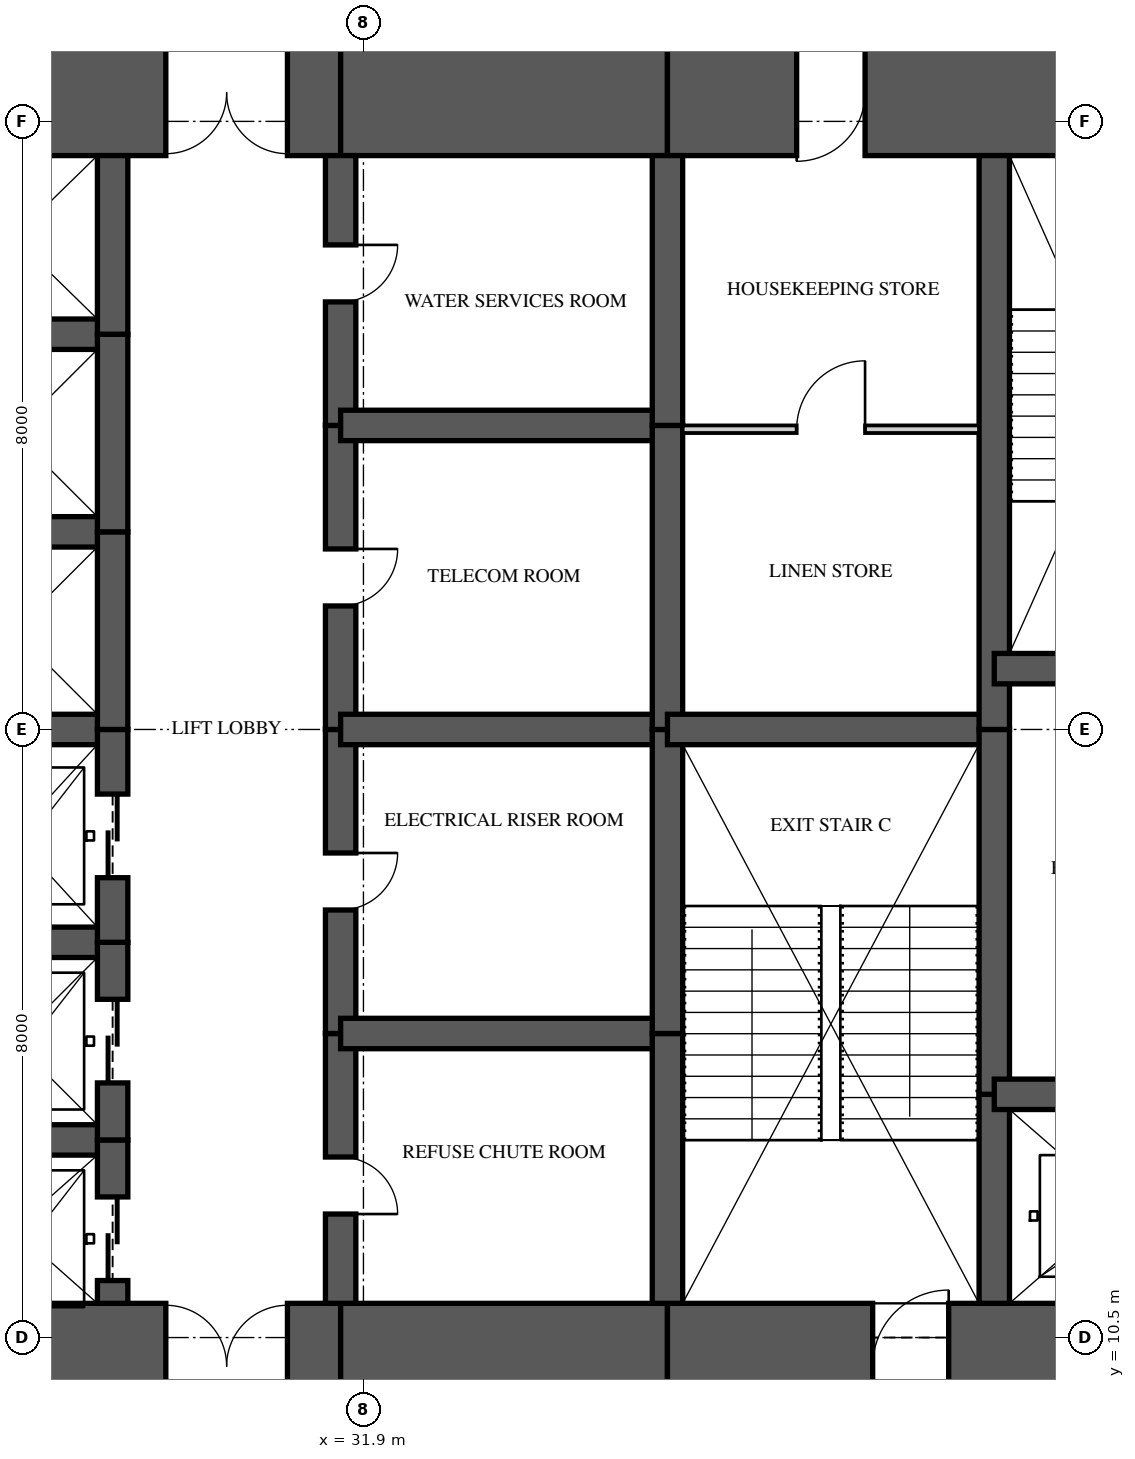
"""IFC4 building model, lengths in metres.
Left out: names, types, materials, properties, quantities, classifications, styles, units other than length and angle.
Written with IfcOpenShell. Run it as: python <this file> out.ifc"""

import sys

from ifc_helpers import new_model, si_unit, direction, frame, frame_2d, origin, place, context, subcontext, project, spatial, rectangle, extrude, element, fill, save


model = new_model("IFC4")
c1 = context("Model", 3, precision=1e-05, world=origin(), true_north=direction((0.0, 1.0)))
c2 = subcontext(c1, "Body", "Model", "MODEL_VIEW")
j1 = project(units=[si_unit("LENGTHUNIT", "METRE"), si_unit("PLANEANGLEUNIT", "RADIAN")], contexts=[c1])
p1 = place(None, origin())
s1 = spatial("IfcSite", under=j1, at=p1, CompositionType="ELEMENT")
p2 = place(p1, origin())
s2 = spatial("IfcBuilding", under=s1, at=p2, CompositionType="ELEMENT")
p3 = place(p2, frame((0.0, 0.0, 54.5)))
s3 = spatial("IfcBuildingStorey", under=s2, at=p3, CompositionType="ELEMENT", Elevation=54.5)
p4 = place(p3, frame((26.0, 10.125, 0.0), z_axis=(0.0, 0.0, 1.0), x_axis=(1.0, 0.0, 0.0)))
e1 = element("IfcWall", 1, at=p4, inside=s3, PredefinedType="SHEAR", context=c2, shape_type="SweptSolid", body=[
    extrude(rectangle(XDim=5.6, YDim=1.65, at=frame_2d((2.8, 0.0))), origin(), (0.0, 0.0, 1.0), 3.35),
])
p5 = place(p4, frame((3.3, 0.0, 0.0)))
e2 = element("IfcOpeningElement", 2, at=p5, cuts=e1, PredefinedType="OPENING", context=c2, shape_type="SweptSolid", body=[
    extrude(rectangle(XDim=1.6, YDim=2.1, at=frame_2d((0.8, 1.05))), frame((0.0, 0.835, 0.0), z_axis=(0.0, -1.0, 0.0), x_axis=(1.0, 0.0, 0.0)), (0.0, 0.0, 1.0), 1.67),
])
p6 = place(p3, frame((31.6, 10.125, 0.0), z_axis=(0.0, 0.0, 1.0), x_axis=(1.0, 0.0, 0.0)))
e3 = element("IfcWall", 3, at=p6, inside=s3, PredefinedType="SHEAR", context=c2, shape_type="SweptSolid", body=[
    extrude(rectangle(XDim=4.3, YDim=1.65, at=frame_2d((2.15, 0.0))), origin(), (0.0, 0.0, 1.0), 3.35),
])
p7 = place(p3, frame((35.9, 10.125, 0.0), z_axis=(0.0, 0.0, 1.0), x_axis=(1.0, 0.0, 0.0)))
e4 = element("IfcWall", 4, at=p7, inside=s3, PredefinedType="SHEAR", context=c2, shape_type="SweptSolid", body=[
    extrude(rectangle(XDim=8.375, YDim=1.65, at=frame_2d((4.188, 0.0))), origin(), (0.0, 0.0, 1.0), 3.35),
])
p8 = place(p7, frame((2.7, 0.0, 0.0)))
e5 = element("IfcOpeningElement", 5, at=p8, cuts=e4, PredefinedType="OPENING", context=c2, shape_type="SweptSolid", body=[
    extrude(rectangle(XDim=1.0, YDim=2.1, at=frame_2d((0.5, 1.05))), frame((0.0, 0.835, 0.0), z_axis=(0.0, -1.0, 0.0), x_axis=(1.0, 0.0, 0.0)), (0.0, 0.0, 1.0), 1.67),
])
p9 = place(p3, frame((44.275, 26.875, 0.0), z_axis=(0.0, 0.0, 1.0), x_axis=(-1.0, 0.0, 0.0)))
e6 = element("IfcWall", 6, at=p9, inside=s3, PredefinedType="SHEAR", context=c2, shape_type="SweptSolid", body=[
    extrude(rectangle(XDim=8.375, YDim=1.65, at=frame_2d((4.188, 0.0))), origin(), (0.0, 0.0, 1.0), 3.35),
])
p10 = place(p9, frame((5.775, 0.0, 0.0)))
e7 = element("IfcOpeningElement", 7, at=p10, cuts=e6, PredefinedType="OPENING", context=c2, shape_type="SweptSolid", body=[
    extrude(rectangle(XDim=0.9, YDim=2.1, at=frame_2d((0.45, 1.05))), frame((0.0, 0.835, 0.0), z_axis=(0.0, -1.0, 0.0), x_axis=(1.0, 0.0, 0.0)), (0.0, 0.0, 1.0), 1.67),
])
p11 = place(p3, frame((35.9, 26.875, 0.0), z_axis=(0.0, 0.0, 1.0), x_axis=(-1.0, 0.0, 0.0)))
e8 = element("IfcWall", 8, at=p11, inside=s3, PredefinedType="SHEAR", context=c2, shape_type="SweptSolid", body=[
    extrude(rectangle(XDim=4.3, YDim=1.65, at=frame_2d((2.15, 0.0))), origin(), (0.0, 0.0, 1.0), 3.35),
])
p12 = place(p3, frame((31.6, 26.875, 0.0), z_axis=(0.0, 0.0, 1.0), x_axis=(-1.0, 0.0, 0.0)))
e9 = element("IfcWall", 9, at=p12, inside=s3, PredefinedType="SHEAR", context=c2, shape_type="SweptSolid", body=[
    extrude(rectangle(XDim=5.6, YDim=1.65, at=frame_2d((2.8, 0.0))), origin(), (0.0, 0.0, 1.0), 3.35),
])
p13 = place(p12, frame((0.7, 0.0, 0.0)))
e10 = element("IfcOpeningElement", 10, at=p13, cuts=e9, PredefinedType="OPENING", context=c2, shape_type="SweptSolid", body=[
    extrude(rectangle(XDim=1.6, YDim=2.1, at=frame_2d((0.8, 1.05))), frame((0.0, 0.835, 0.0), z_axis=(0.0, -1.0, 0.0), x_axis=(1.0, 0.0, 0.0)), (0.0, 0.0, 1.0), 1.67),
])
p14 = place(p3, frame((28.6, 10.95, 0.0), z_axis=(0.0, 0.0, 1.0), x_axis=(0.0, 1.0, 0.0)))
e11 = element("IfcWall", 11, at=p14, inside=s3, PredefinedType="SHEAR", context=c2, shape_type="SweptSolid", body=[
    extrude(rectangle(XDim=2.15, YDim=0.4, at=frame_2d((1.075, 0.0))), origin(), (0.0, 0.0, 1.0), 3.35),
])
p15 = place(p14, frame((0.3, 0.0, 0.0)))
e12 = element("IfcOpeningElement", 12, at=p15, cuts=e11, PredefinedType="OPENING", context=c2, shape_type="SweptSolid", body=[
    extrude(rectangle(XDim=1.1, YDim=2.1, at=frame_2d((0.55, 1.05))), frame((0.0, 0.21, 0.0), z_axis=(0.0, -1.0, 0.0), x_axis=(1.0, 0.0, 0.0)), (0.0, 0.0, 1.0), 0.42),
])
p16 = place(p3, frame((28.6, 13.1, 0.0), z_axis=(0.0, 0.0, 1.0), x_axis=(0.0, 1.0, 0.0)))
e13 = element("IfcWall", 13, at=p16, inside=s3, PredefinedType="SHEAR", context=c2, shape_type="SweptSolid", body=[
    extrude(rectangle(XDim=2.6, YDim=0.4, at=frame_2d((1.3, 0.0))), origin(), (0.0, 0.0, 1.0), 3.35),
])
p17 = place(p16, frame((0.75, 0.0, 0.0)))
e14 = element("IfcOpeningElement", 14, at=p17, cuts=e13, PredefinedType="OPENING", context=c2, shape_type="SweptSolid", body=[
    extrude(rectangle(XDim=1.1, YDim=2.1, at=frame_2d((0.55, 1.05))), frame((0.0, 0.21, 0.0), z_axis=(0.0, -1.0, 0.0), x_axis=(1.0, 0.0, 0.0)), (0.0, 0.0, 1.0), 0.42),
])
p18 = place(p3, frame((28.6, 15.7, 0.0), z_axis=(0.0, 0.0, 1.0), x_axis=(0.0, 1.0, 0.0)))
e15 = element("IfcWall", 15, at=p18, inside=s3, PredefinedType="SHEAR", context=c2, shape_type="SweptSolid", body=[
    extrude(rectangle(XDim=2.8, YDim=0.4, at=frame_2d((1.4, 0.0))), origin(), (0.0, 0.0, 1.0), 3.35),
])
p19 = place(p18, frame((0.85, 0.0, 0.0)))
e16 = element("IfcOpeningElement", 16, at=p19, cuts=e15, PredefinedType="OPENING", context=c2, shape_type="SweptSolid", body=[
    extrude(rectangle(XDim=1.1, YDim=2.1, at=frame_2d((0.55, 1.05))), frame((0.0, 0.21, 0.0), z_axis=(0.0, -1.0, 0.0), x_axis=(1.0, 0.0, 0.0)), (0.0, 0.0, 1.0), 0.42),
])
p20 = place(p3, frame((28.6, 18.5, 0.0), z_axis=(0.0, 0.0, 1.0), x_axis=(0.0, 1.0, 0.0)))
e17 = element("IfcWall", 17, at=p20, inside=s3, PredefinedType="SHEAR", context=c2, shape_type="SweptSolid", body=[
    extrude(rectangle(XDim=2.6, YDim=0.4, at=frame_2d((1.3, 0.0))), origin(), (0.0, 0.0, 1.0), 3.35),
])
p21 = place(p3, frame((28.6, 21.1, 0.0), z_axis=(0.0, 0.0, 1.0), x_axis=(0.0, 1.0, 0.0)))
e18 = element("IfcWall", 18, at=p21, inside=s3, PredefinedType="SHEAR", context=c2, shape_type="SweptSolid", body=[
    extrude(rectangle(XDim=2.6, YDim=0.4, at=frame_2d((1.3, 0.0))), origin(), (0.0, 0.0, 1.0), 3.35),
])
p22 = place(p3, frame((28.6, 23.7, 0.0), z_axis=(0.0, 0.0, 1.0), x_axis=(0.0, 1.0, 0.0)))
e19 = element("IfcWall", 19, at=p22, inside=s3, PredefinedType="SHEAR", context=c2, shape_type="SweptSolid", body=[
    extrude(rectangle(XDim=2.35, YDim=0.4, at=frame_2d((1.175, 0.0))), origin(), (0.0, 0.0, 1.0), 3.35),
])
p23 = place(p3, frame((31.6, 10.95, 0.0), z_axis=(0.0, 0.0, 1.0), x_axis=(0.0, 1.0, 0.0)))
e20 = element("IfcWall", 20, at=p23, inside=s3, PredefinedType="SHEAR", context=c2, shape_type="SweptSolid", body=[
    extrude(rectangle(XDim=3.55, YDim=0.4, at=frame_2d((1.775, 0.0))), origin(), (0.0, 0.0, 1.0), 3.35),
])
p24 = place(p23, frame((1.175, 0.0, 0.0)))
e21 = element("IfcOpeningElement", 21, at=p24, cuts=e20, PredefinedType="OPENING", context=c2, shape_type="SweptSolid", body=[
    extrude(rectangle(XDim=0.75, YDim=2.1, at=frame_2d((0.375, 1.05))), frame((0.0, 0.21, 0.0), z_axis=(0.0, -1.0, 0.0), x_axis=(1.0, 0.0, 0.0)), (0.0, 0.0, 1.0), 0.42),
])
p25 = place(p3, frame((31.6, 14.5, 0.0), z_axis=(0.0, 0.0, 1.0), x_axis=(0.0, 1.0, 0.0)))
e22 = element("IfcWall", 22, at=p25, inside=s3, PredefinedType="SHEAR", context=c2, shape_type="SweptSolid", body=[
    extrude(rectangle(XDim=4.0, YDim=0.4, at=frame_2d((2.0, 0.0))), origin(), (0.0, 0.0, 1.0), 3.35),
])
p26 = place(p25, frame((1.625, 0.0, 0.0)))
e23 = element("IfcOpeningElement", 23, at=p26, cuts=e22, PredefinedType="OPENING", context=c2, shape_type="SweptSolid", body=[
    extrude(rectangle(XDim=0.75, YDim=2.1, at=frame_2d((0.375, 1.05))), frame((0.0, 0.21, 0.0), z_axis=(0.0, -1.0, 0.0), x_axis=(1.0, 0.0, 0.0)), (0.0, 0.0, 1.0), 0.42),
])
p27 = place(p3, frame((31.6, 18.5, 0.0), z_axis=(0.0, 0.0, 1.0), x_axis=(0.0, 1.0, 0.0)))
e24 = element("IfcWall", 24, at=p27, inside=s3, PredefinedType="SHEAR", context=c2, shape_type="SweptSolid", body=[
    extrude(rectangle(XDim=4.0, YDim=0.4, at=frame_2d((2.0, 0.0))), origin(), (0.0, 0.0, 1.0), 3.35),
])
p28 = place(p27, frame((1.625, 0.0, 0.0)))
e25 = element("IfcOpeningElement", 25, at=p28, cuts=e24, PredefinedType="OPENING", context=c2, shape_type="SweptSolid", body=[
    extrude(rectangle(XDim=0.75, YDim=2.1, at=frame_2d((0.375, 1.05))), frame((0.0, 0.21, 0.0), z_axis=(0.0, -1.0, 0.0), x_axis=(1.0, 0.0, 0.0)), (0.0, 0.0, 1.0), 0.42),
])
p29 = place(p3, frame((31.6, 22.5, 0.0), z_axis=(0.0, 0.0, 1.0), x_axis=(0.0, 1.0, 0.0)))
e26 = element("IfcWall", 26, at=p29, inside=s3, PredefinedType="SHEAR", context=c2, shape_type="SweptSolid", body=[
    extrude(rectangle(XDim=3.55, YDim=0.4, at=frame_2d((1.775, 0.0))), origin(), (0.0, 0.0, 1.0), 3.35),
])
p30 = place(p29, frame((1.625, 0.0, 0.0)))
e27 = element("IfcOpeningElement", 27, at=p30, cuts=e26, PredefinedType="OPENING", context=c2, shape_type="SweptSolid", body=[
    extrude(rectangle(XDim=0.75, YDim=2.1, at=frame_2d((0.375, 1.05))), frame((0.0, 0.21, 0.0), z_axis=(0.0, -1.0, 0.0), x_axis=(1.0, 0.0, 0.0)), (0.0, 0.0, 1.0), 0.42),
])
p31 = place(p3, frame((35.9, 10.95, 0.0), z_axis=(0.0, 0.0, 1.0), x_axis=(0.0, 1.0, 0.0)))
e28 = element("IfcWall", 28, at=p31, inside=s3, PredefinedType="SHEAR", context=c2, shape_type="SweptSolid", body=[
    extrude(rectangle(XDim=3.55, YDim=0.4, at=frame_2d((1.775, 0.0))), origin(), (0.0, 0.0, 1.0), 3.35),
])
for number, where, z_axis, x_axis in (
    (29, (35.9, 14.5, 0.0), (0.0, 0.0, 1.0), (0.0, 1.0, 0.0)),
    (30, (35.9, 18.5, 0.0), (0.0, 0.0, 1.0), (0.0, 1.0, 0.0)),
):
    element("IfcWall", number, at=place(p3, frame(where, z_axis=z_axis, x_axis=x_axis)), inside=s3, PredefinedType="SHEAR", context=c2, shape_type="SweptSolid", body=[
        extrude(rectangle(XDim=4.0, YDim=0.4, at=frame_2d((2.0, 0.0))), origin(), (0.0, 0.0, 1.0), 3.35),
    ])
p32 = place(p3, frame((35.9, 22.5, 0.0), z_axis=(0.0, 0.0, 1.0), x_axis=(0.0, 1.0, 0.0)))
e31 = element("IfcWall", 31, at=p32, inside=s3, PredefinedType="SHEAR", context=c2, shape_type="SweptSolid", body=[
    extrude(rectangle(XDim=3.55, YDim=0.4, at=frame_2d((1.775, 0.0))), origin(), (0.0, 0.0, 1.0), 3.35),
])
p33 = place(p3, frame((40.2, 10.95, 0.0), z_axis=(0.0, 0.0, 1.0), x_axis=(0.0, 1.0, 0.0)))
e32 = element("IfcWall", 32, at=p33, inside=s3, PredefinedType="SHEAR", context=c2, shape_type="SweptSolid", body=[
    extrude(rectangle(XDim=2.75, YDim=0.4, at=frame_2d((1.375, 0.0))), origin(), (0.0, 0.0, 1.0), 3.35),
])
p34 = place(p3, frame((40.2, 13.7, 0.0), z_axis=(0.0, 0.0, 1.0), x_axis=(0.0, 1.0, 0.0)))
e33 = element("IfcWall", 33, at=p34, inside=s3, PredefinedType="SHEAR", context=c2, shape_type="SweptSolid", body=[
    extrude(rectangle(XDim=4.8, YDim=0.4, at=frame_2d((2.4, 0.0))), origin(), (0.0, 0.0, 1.0), 3.35),
])
p35 = place(p3, frame((40.2, 18.5, 0.0), z_axis=(0.0, 0.0, 1.0), x_axis=(0.0, 1.0, 0.0)))
e34 = element("IfcWall", 34, at=p35, inside=s3, PredefinedType="SHEAR", context=c2, shape_type="SweptSolid", body=[
    extrude(rectangle(XDim=7.55, YDim=0.4, at=frame_2d((3.775, 0.0))), origin(), (0.0, 0.0, 1.0), 3.35),
])
for number, where, z_axis, x_axis in (
    (35, (26.0, 13.1, 0.0), (0.0, 0.0, 1.0), (1.0, 0.0, 0.0)),
    (36, (26.0, 15.7, 0.0), (0.0, 0.0, 1.0), (1.0, 0.0, 0.0)),
    (37, (26.0, 18.5, 0.0), (0.0, 0.0, 1.0), (1.0, 0.0, 0.0)),
    (38, (26.0, 21.1, 0.0), (0.0, 0.0, 1.0), (1.0, 0.0, 0.0)),
    (39, (26.0, 23.7, 0.0), (0.0, 0.0, 1.0), (1.0, 0.0, 0.0)),
):
    element("IfcWall", number, at=place(p3, frame(where, z_axis=z_axis, x_axis=x_axis)), inside=s3, PredefinedType="SHEAR", context=c2, shape_type="SweptSolid", body=[
        extrude(rectangle(XDim=2.6, YDim=0.4, at=frame_2d((1.3, 0.0))), origin(), (0.0, 0.0, 1.0), 3.35),
    ])
for number, where, z_axis, x_axis in (
    (40, (31.6, 14.5, 0.0), (0.0, 0.0, 1.0), (1.0, 0.0, 0.0)),
    (41, (31.6, 18.5, 0.0), (0.0, 0.0, 1.0), (1.0, 0.0, 0.0)),
    (42, (31.6, 22.5, 0.0), (0.0, 0.0, 1.0), (1.0, 0.0, 0.0)),
):
    element("IfcWall", number, at=place(p3, frame(where, z_axis=z_axis, x_axis=x_axis)), inside=s3, PredefinedType="SHEAR", context=c2, shape_type="SweptSolid", body=[
        extrude(rectangle(XDim=4.3, YDim=0.4, at=frame_2d((2.15, 0.0))), origin(), (0.0, 0.0, 1.0), 3.35),
    ])
p36 = place(p3, frame((35.9, 18.5, 0.0), z_axis=(0.0, 0.0, 1.0), x_axis=(1.0, 0.0, 0.0)))
e43 = element("IfcWall", 43, at=p36, inside=s3, PredefinedType="SHEAR", context=c2, shape_type="SweptSolid", body=[
    extrude(rectangle(XDim=4.3, YDim=0.4, at=frame_2d((2.15, 0.0))), origin(), (0.0, 0.0, 1.0), 3.35),
])
p37 = place(p3, frame((40.2, 13.7, 0.0), z_axis=(0.0, 0.0, 1.0), x_axis=(1.0, 0.0, 0.0)))
e44 = element("IfcWall", 44, at=p37, inside=s3, PredefinedType="SHEAR", context=c2, shape_type="SweptSolid", body=[
    extrude(rectangle(XDim=3.6, YDim=0.4, at=frame_2d((1.8, 0.0))), origin(), (0.0, 0.0, 1.0), 3.35),
])
p38 = place(p37, frame((1.2, 0.0, 0.0)))
e45 = element("IfcOpeningElement", 45, at=p38, cuts=e44, PredefinedType="OPENING", context=c2, shape_type="SweptSolid", body=[
    extrude(rectangle(XDim=1.2, YDim=2.1, at=frame_2d((0.6, 1.05))), frame((0.0, 0.21, 0.0), z_axis=(0.0, -1.0, 0.0), x_axis=(1.0, 0.0, 0.0)), (0.0, 0.0, 1.0), 0.42),
])
p39 = place(p3, frame((40.2, 19.3, 0.0), z_axis=(0.0, 0.0, 1.0), x_axis=(1.0, 0.0, 0.0)))
e46 = element("IfcWall", 46, at=p39, inside=s3, PredefinedType="SHEAR", context=c2, shape_type="SweptSolid", body=[
    extrude(rectangle(XDim=3.6, YDim=0.4, at=frame_2d((1.8, 0.0))), origin(), (0.0, 0.0, 1.0), 3.35),
])
p40 = place(p39, frame((1.3, 0.0, 0.0)))
e47 = element("IfcOpeningElement", 47, at=p40, cuts=e46, PredefinedType="OPENING", context=c2, shape_type="SweptSolid", body=[
    extrude(rectangle(XDim=1.0, YDim=2.1, at=frame_2d((0.5, 1.05))), frame((0.0, 0.21, 0.0), z_axis=(0.0, -1.0, 0.0), x_axis=(1.0, 0.0, 0.0)), (0.0, 0.0, 1.0), 0.42),
])
p41 = place(p3, frame((36.1, 22.45, 0.0), z_axis=(0.0, 0.0, 1.0), x_axis=(1.0, 0.0, 0.0)))
e48 = element("IfcWall", 48, at=p41, inside=s3, PredefinedType="PARTITIONING", context=c2, shape_type="SweptSolid", body=[
    extrude(rectangle(XDim=3.9, YDim=0.1, at=frame_2d((1.95, 0.0))), origin(), (0.0, 0.0, 1.0), 3.11),
])
p42 = place(p41, frame((1.5, 0.0, 0.0)))
e49 = element("IfcOpeningElement", 49, at=p42, cuts=e48, PredefinedType="OPENING", context=c2, shape_type="SweptSolid", body=[
    extrude(rectangle(XDim=0.9, YDim=2.1, at=frame_2d((0.45, 1.05))), frame((0.0, 0.06, 0.0), z_axis=(0.0, -1.0, 0.0), x_axis=(1.0, 0.0, 0.0)), (0.0, 0.0, 1.0), 0.12),
])
p43 = place(p42, origin())
e50 = element("IfcDoor", 50, at=p43, inside=s3, OperationType="SINGLE_SWING_RIGHT", PredefinedType="DOOR", context=c2, shape_type="SweptSolid", body=[
    extrude(rectangle(XDim=0.9, YDim=2.1, at=frame_2d((0.45, 1.05))), frame((0.0, 0.025, 0.0), z_axis=(0.0, -1.0, 0.0), x_axis=(1.0, 0.0, 0.0)), (0.0, 0.0, 1.0), 0.05),
])
fill(e49, e50)
p44 = place(p15, origin())
e51 = element("IfcDoor", 51, at=p44, inside=s3, OperationType="SLIDING_TO_LEFT", PredefinedType="DOOR", context=c2, shape_type="SweptSolid", body=[
    extrude(rectangle(XDim=1.1, YDim=2.1, at=frame_2d((0.55, 1.05))), frame((0.0, 0.025, 0.0), z_axis=(0.0, -1.0, 0.0), x_axis=(1.0, 0.0, 0.0)), (0.0, 0.0, 1.0), 0.05),
])
fill(e12, e51)
p45 = place(p17, origin())
e52 = element("IfcDoor", 52, at=p45, inside=s3, OperationType="SLIDING_TO_LEFT", PredefinedType="DOOR", context=c2, shape_type="SweptSolid", body=[
    extrude(rectangle(XDim=1.1, YDim=2.1, at=frame_2d((0.55, 1.05))), frame((0.0, 0.025, 0.0), z_axis=(0.0, -1.0, 0.0), x_axis=(1.0, 0.0, 0.0)), (0.0, 0.0, 1.0), 0.05),
])
fill(e14, e52)
p46 = place(p19, origin())
e53 = element("IfcDoor", 53, at=p46, inside=s3, OperationType="SLIDING_TO_LEFT", PredefinedType="DOOR", context=c2, shape_type="SweptSolid", body=[
    extrude(rectangle(XDim=1.1, YDim=2.1, at=frame_2d((0.55, 1.05))), frame((0.0, 0.025, 0.0), z_axis=(0.0, -1.0, 0.0), x_axis=(1.0, 0.0, 0.0)), (0.0, 0.0, 1.0), 0.05),
])
fill(e16, e53)
p47 = place(p5, origin())
e54 = element("IfcDoor", 54, at=p47, inside=s3, OperationType="DOUBLE_DOOR_SINGLE_SWING", PredefinedType="DOOR", context=c2, shape_type="SweptSolid", body=[
    extrude(rectangle(XDim=1.6, YDim=2.1, at=frame_2d((0.8, 1.05))), frame((0.0, 0.025, 0.0), z_axis=(0.0, -1.0, 0.0), x_axis=(1.0, 0.0, 0.0)), (0.0, 0.0, 1.0), 0.05),
])
fill(e2, e54)
p48 = place(p13, origin())
e55 = element("IfcDoor", 55, at=p48, inside=s3, OperationType="DOUBLE_DOOR_SINGLE_SWING", PredefinedType="DOOR", context=c2, shape_type="SweptSolid", body=[
    extrude(rectangle(XDim=1.6, YDim=2.1, at=frame_2d((0.8, 1.05))), frame((0.0, 0.025, 0.0), z_axis=(0.0, -1.0, 0.0), x_axis=(1.0, 0.0, 0.0)), (0.0, 0.0, 1.0), 0.05),
])
fill(e10, e55)
p49 = place(p24, frame((0.75, 0.0, 0.0), z_axis=(0.0, 0.0, 1.0), x_axis=(-1.0, 0.0, 0.0)))
e56 = element("IfcDoor", 56, at=p49, inside=s3, OperationType="SINGLE_SWING_RIGHT", PredefinedType="DOOR", context=c2, shape_type="SweptSolid", body=[
    extrude(rectangle(XDim=0.75, YDim=2.1, at=frame_2d((0.375, 1.05))), frame((0.0, 0.025, 0.0), z_axis=(0.0, -1.0, 0.0), x_axis=(1.0, 0.0, 0.0)), (0.0, 0.0, 1.0), 0.05),
])
fill(e21, e56)
p50 = place(p26, frame((0.75, 0.0, 0.0), z_axis=(0.0, 0.0, 1.0), x_axis=(-1.0, 0.0, 0.0)))
e57 = element("IfcDoor", 57, at=p50, inside=s3, OperationType="SINGLE_SWING_LEFT", PredefinedType="DOOR", context=c2, shape_type="SweptSolid", body=[
    extrude(rectangle(XDim=0.75, YDim=2.1, at=frame_2d((0.375, 1.05))), frame((0.0, 0.025, 0.0), z_axis=(0.0, -1.0, 0.0), x_axis=(1.0, 0.0, 0.0)), (0.0, 0.0, 1.0), 0.05),
])
fill(e23, e57)
p51 = place(p28, frame((0.75, 0.0, 0.0), z_axis=(0.0, 0.0, 1.0), x_axis=(-1.0, 0.0, 0.0)))
e58 = element("IfcDoor", 58, at=p51, inside=s3, OperationType="SINGLE_SWING_LEFT", PredefinedType="DOOR", context=c2, shape_type="SweptSolid", body=[
    extrude(rectangle(XDim=0.75, YDim=2.1, at=frame_2d((0.375, 1.05))), frame((0.0, 0.025, 0.0), z_axis=(0.0, -1.0, 0.0), x_axis=(1.0, 0.0, 0.0)), (0.0, 0.0, 1.0), 0.05),
])
fill(e25, e58)
p52 = place(p30, frame((0.75, 0.0, 0.0), z_axis=(0.0, 0.0, 1.0), x_axis=(-1.0, 0.0, 0.0)))
e59 = element("IfcDoor", 59, at=p52, inside=s3, OperationType="SINGLE_SWING_LEFT", PredefinedType="DOOR", context=c2, shape_type="SweptSolid", body=[
    extrude(rectangle(XDim=0.75, YDim=2.1, at=frame_2d((0.375, 1.05))), frame((0.0, 0.025, 0.0), z_axis=(0.0, -1.0, 0.0), x_axis=(1.0, 0.0, 0.0)), (0.0, 0.0, 1.0), 0.05),
])
fill(e27, e59)
p53 = place(p8, origin())
e60 = element("IfcDoor", 60, at=p53, inside=s3, OperationType="SINGLE_SWING_RIGHT", PredefinedType="DOOR", context=c2, shape_type="SweptSolid", body=[
    extrude(rectangle(XDim=1.0, YDim=2.1, at=frame_2d((0.5, 1.05))), frame((0.0, 0.025, 0.0), z_axis=(0.0, -1.0, 0.0), x_axis=(1.0, 0.0, 0.0)), (0.0, 0.0, 1.0), 0.05),
])
fill(e5, e60)
p54 = place(p10, origin())
e61 = element("IfcDoor", 61, at=p54, inside=s3, OperationType="SINGLE_SWING_RIGHT", PredefinedType="DOOR", context=c2, shape_type="SweptSolid", body=[
    extrude(rectangle(XDim=0.9, YDim=2.1, at=frame_2d((0.45, 1.05))), frame((0.0, 0.47, 0.0), z_axis=(0.0, -1.0, 0.0), x_axis=(1.0, 0.0, 0.0)), (0.0, 0.0, 1.0), 0.8),
])
fill(e7, e61)
save(model, sys.argv[1])
